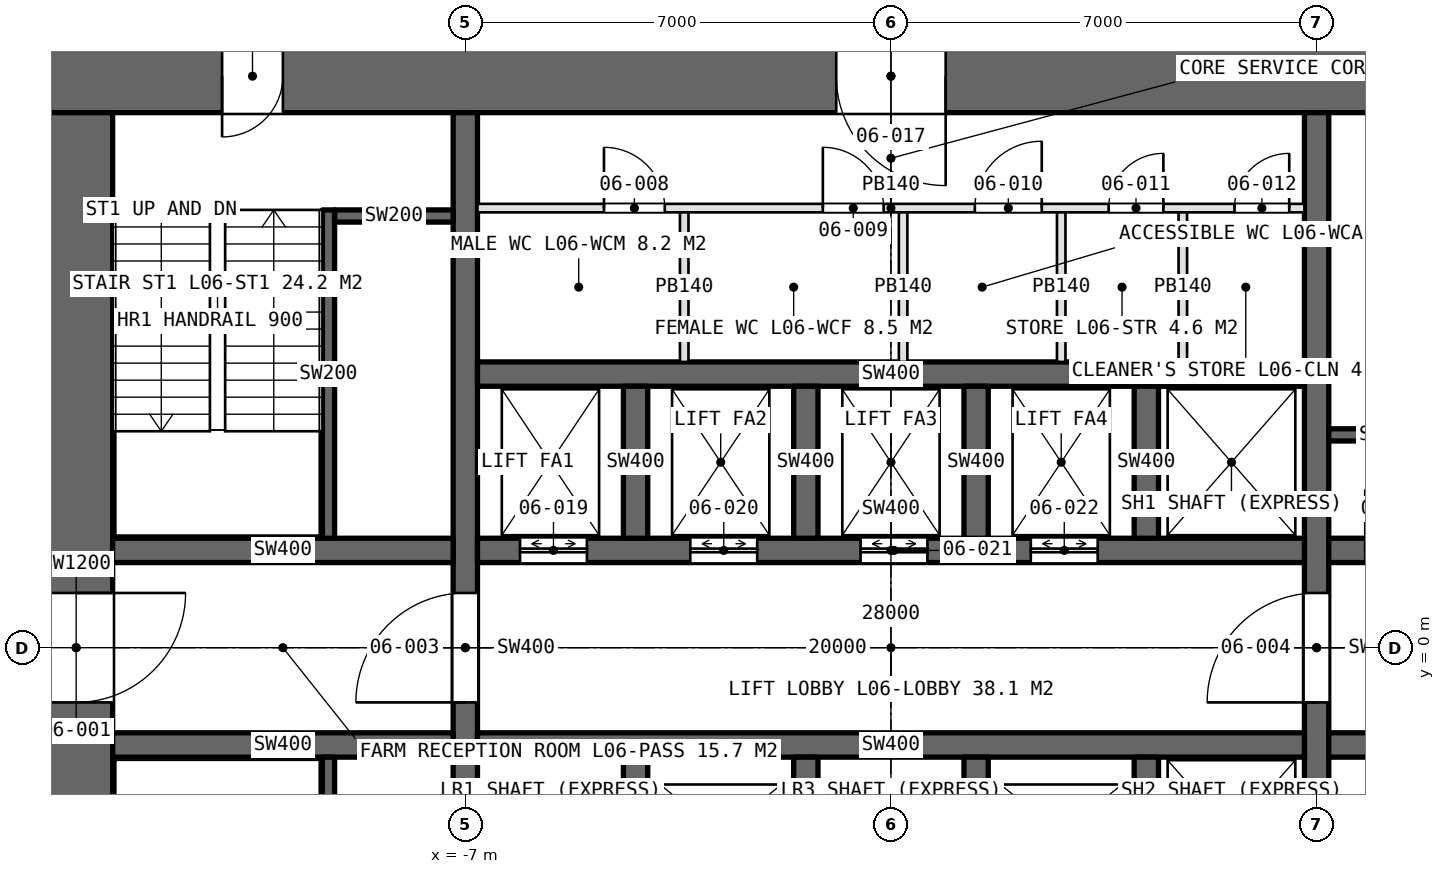
"""IFC4 building model, lengths in metres.
Left out: names, types, materials, properties, quantities, classifications, styles, units other than length and angle.
Written with IfcOpenShell. Run it as: python <this file> out.ifc"""

import sys

from ifc_helpers import new_model, si_unit, direction, frame, frame_2d, origin, place, context, subcontext, project, spatial, rectangle, extrude, element, fill, save


model = new_model("IFC4")
c1 = context("Model", 3, precision=1e-05, world=origin(), true_north=direction((0.0, 1.0)))
c2 = subcontext(c1, "Body", "Model", "MODEL_VIEW")
j1 = project(units=[si_unit("LENGTHUNIT", "METRE"), si_unit("PLANEANGLEUNIT", "RADIAN")], contexts=[c1])
p1 = place(None, origin())
s1 = spatial("IfcSite", under=j1, at=p1, CompositionType="ELEMENT")
p2 = place(p1, origin())
s2 = spatial("IfcBuilding", under=s1, at=p2, CompositionType="ELEMENT")
p3 = place(p2, frame((0.0, 0.0, 30.0)))
s3 = spatial("IfcBuildingStorey", under=s2, at=p3, CompositionType="ELEMENT", Elevation=30.0)
p4 = place(p3, frame((14.0, 9.4, 0.0), z_axis=(0.0, 0.0, 1.0), x_axis=(-1.0, 0.0, 0.0)))
e1 = element("IfcWall", 1, at=p4, inside=s3, PredefinedType="SHEAR", context=c2, shape_type="SweptSolid", body=[
    extrude(rectangle(XDim=28.0, YDim=1.2, at=frame_2d((14.0, 0.0))), origin(), (0.0, 0.0, 1.0), 5.0),
])
p5 = place(p4, frame((24.0, 0.0, 0.0)))
e2 = element("IfcOpeningElement", 2, at=p5, cuts=e1, PredefinedType="OPENING", context=c2, shape_type="SweptSolid", body=[
    extrude(rectangle(XDim=1.0, YDim=2.4, at=frame_2d((0.5, 1.2))), frame((0.0, 0.61, 0.0), z_axis=(0.0, -1.0, 0.0), x_axis=(1.0, 0.0, 0.0)), (0.0, 0.0, 1.0), 1.22),
])
p6 = place(p4, frame((13.1, 0.0, 0.0)))
e3 = element("IfcOpeningElement", 3, at=p6, cuts=e1, PredefinedType="OPENING", context=c2, shape_type="SweptSolid", body=[
    extrude(rectangle(XDim=1.8, YDim=2.4, at=frame_2d((0.9, 1.2))), frame((0.0, 0.61, 0.0), z_axis=(0.0, -1.0, 0.0), x_axis=(1.0, 0.0, 0.0)), (0.0, 0.0, 1.0), 1.22),
])
p7 = place(p3, frame((-13.4, 8.8, 0.0), z_axis=(0.0, 0.0, 1.0), x_axis=(0.0, -1.0, 0.0)))
e4 = element("IfcWall", 4, at=p7, inside=s3, PredefinedType="SHEAR", context=c2, shape_type="SweptSolid", body=[
    extrude(rectangle(XDim=17.6, YDim=1.2, at=frame_2d((8.8, 0.0))), origin(), (0.0, 0.0, 1.0), 5.0),
])
p8 = place(p7, frame((7.9, 0.0, 0.0)))
e5 = element("IfcOpeningElement", 5, at=p8, cuts=e4, PredefinedType="OPENING", context=c2, shape_type="SweptSolid", body=[
    extrude(rectangle(XDim=1.8, YDim=2.4, at=frame_2d((0.9, 1.2))), frame((0.0, 0.61, 0.0), z_axis=(0.0, -1.0, 0.0), x_axis=(1.0, 0.0, 0.0)), (0.0, 0.0, 1.0), 1.22),
])
p9 = place(p7, frame((16.5, 0.0, 0.0)))
e6 = element("IfcOpeningElement", 6, at=p9, cuts=e4, PredefinedType="OPENING", context=c2, shape_type="SweptSolid", body=[
    extrude(rectangle(XDim=1.0, YDim=2.4, at=frame_2d((0.5, 1.2))), frame((0.0, 0.61, 0.0), z_axis=(0.0, -1.0, 0.0), x_axis=(1.0, 0.0, 0.0)), (0.0, 0.0, 1.0), 1.22),
])
p10 = place(p3, frame((-7.0, -8.8, 0.0), z_axis=(0.0, 0.0, 1.0), x_axis=(0.0, 1.0, 0.0)))
e7 = element("IfcWall", 7, at=p10, inside=s3, PredefinedType="SHEAR", context=c2, shape_type="SweptSolid", body=[
    extrude(rectangle(XDim=17.6, YDim=0.4, at=frame_2d((8.8, 0.0))), origin(), (0.0, 0.0, 1.0), 5.0),
])
p11 = place(p10, frame((7.9, 0.0, 0.0)))
e8 = element("IfcOpeningElement", 8, at=p11, cuts=e7, PredefinedType="OPENING", context=c2, shape_type="SweptSolid", body=[
    extrude(rectangle(XDim=1.8, YDim=2.4, at=frame_2d((0.9, 1.2))), frame((0.0, 0.21, 0.0), z_axis=(0.0, -1.0, 0.0), x_axis=(1.0, 0.0, 0.0)), (0.0, 0.0, 1.0), 0.42),
])
p12 = place(p3, frame((7.0, -8.8, 0.0), z_axis=(0.0, 0.0, 1.0), x_axis=(0.0, 1.0, 0.0)))
e9 = element("IfcWall", 9, at=p12, inside=s3, PredefinedType="SHEAR", context=c2, shape_type="SweptSolid", body=[
    extrude(rectangle(XDim=17.6, YDim=0.4, at=frame_2d((8.8, 0.0))), origin(), (0.0, 0.0, 1.0), 5.0),
])
p13 = place(p12, frame((7.9, 0.0, 0.0)))
e10 = element("IfcOpeningElement", 10, at=p13, cuts=e9, PredefinedType="OPENING", context=c2, shape_type="SweptSolid", body=[
    extrude(rectangle(XDim=1.8, YDim=2.4, at=frame_2d((0.9, 1.2))), frame((0.0, 0.21, 0.0), z_axis=(0.0, -1.0, 0.0), x_axis=(1.0, 0.0, 0.0)), (0.0, 0.0, 1.0), 0.42),
])
p14 = place(p3, frame((-6.8, 1.6, 0.0), z_axis=(0.0, 0.0, 1.0), x_axis=(1.0, 0.0, 0.0)))
e11 = element("IfcWall", 11, at=p14, inside=s3, PredefinedType="SHEAR", context=c2, shape_type="SweptSolid", body=[
    extrude(rectangle(XDim=13.6, YDim=0.4, at=frame_2d((6.8, 0.0))), origin(), (0.0, 0.0, 1.0), 5.0),
])
p15 = place(p14, frame((0.7, 0.0, 0.0)))
e12 = element("IfcOpeningElement", 12, at=p15, cuts=e11, PredefinedType="OPENING", context=c2, shape_type="SweptSolid", body=[
    extrude(rectangle(XDim=1.1, YDim=2.4, at=frame_2d((0.55, 1.2))), frame((0.0, 0.21, 0.0), z_axis=(0.0, -1.0, 0.0), x_axis=(1.0, 0.0, 0.0)), (0.0, 0.0, 1.0), 0.42),
])
p16 = place(p14, frame((3.5, 0.0, 0.0)))
e13 = element("IfcOpeningElement", 13, at=p16, cuts=e11, PredefinedType="OPENING", context=c2, shape_type="SweptSolid", body=[
    extrude(rectangle(XDim=1.1, YDim=2.4, at=frame_2d((0.55, 1.2))), frame((0.0, 0.21, 0.0), z_axis=(0.0, -1.0, 0.0), x_axis=(1.0, 0.0, 0.0)), (0.0, 0.0, 1.0), 0.42),
])
p17 = place(p14, frame((6.3, 0.0, 0.0)))
e14 = element("IfcOpeningElement", 14, at=p17, cuts=e11, PredefinedType="OPENING", context=c2, shape_type="SweptSolid", body=[
    extrude(rectangle(XDim=1.1, YDim=2.4, at=frame_2d((0.55, 1.2))), frame((0.0, 0.21, 0.0), z_axis=(0.0, -1.0, 0.0), x_axis=(1.0, 0.0, 0.0)), (0.0, 0.0, 1.0), 0.42),
])
p18 = place(p14, frame((9.1, 0.0, 0.0)))
e15 = element("IfcOpeningElement", 15, at=p18, cuts=e11, PredefinedType="OPENING", context=c2, shape_type="SweptSolid", body=[
    extrude(rectangle(XDim=1.1, YDim=2.4, at=frame_2d((0.55, 1.2))), frame((0.0, 0.21, 0.0), z_axis=(0.0, -1.0, 0.0), x_axis=(1.0, 0.0, 0.0)), (0.0, 0.0, 1.0), 0.42),
])
for number, where, z_axis, x_axis in (
    (16, (-6.8, -1.6, 0.0), (0.0, 0.0, 1.0), (1.0, 0.0, 0.0)),
    (17, (-6.8, 4.5, 0.0), (0.0, 0.0, 1.0), (1.0, 0.0, 0.0)),
):
    element("IfcWall", number, at=place(p3, frame(where, z_axis=z_axis, x_axis=x_axis)), inside=s3, PredefinedType="SHEAR", context=c2, shape_type="SweptSolid", body=[
        extrude(rectangle(XDim=13.6, YDim=0.4, at=frame_2d((6.8, 0.0))), origin(), (0.0, 0.0, 1.0), 5.0),
    ])
for number, where, z_axis, x_axis in (
    (18, (-12.8, 1.6, 0.0), (0.0, 0.0, 1.0), (1.0, 0.0, 0.0)),
    (19, (-12.8, -1.6, 0.0), (0.0, 0.0, 1.0), (1.0, 0.0, 0.0)),
):
    element("IfcWall", number, at=place(p3, frame(where, z_axis=z_axis, x_axis=x_axis)), inside=s3, PredefinedType="SHEAR", context=c2, shape_type="SweptSolid", body=[
        extrude(rectangle(XDim=5.6, YDim=0.4, at=frame_2d((2.8, 0.0))), origin(), (0.0, 0.0, 1.0), 5.0),
    ])
p19 = place(p3, frame((7.2, 1.6, 0.0), z_axis=(0.0, 0.0, 1.0), x_axis=(1.0, 0.0, 0.0)))
e20 = element("IfcWall", 20, at=p19, inside=s3, PredefinedType="SHEAR", context=c2, shape_type="SweptSolid", body=[
    extrude(rectangle(XDim=5.6, YDim=0.4, at=frame_2d((2.8, 0.0))), origin(), (0.0, 0.0, 1.0), 5.0),
])
p20 = place(p19, frame((0.6, 0.0, 0.0)))
e21 = element("IfcOpeningElement", 21, at=p20, cuts=e20, PredefinedType="OPENING", context=c2, shape_type="SweptSolid", body=[
    extrude(rectangle(XDim=1.0, YDim=2.4, at=frame_2d((0.5, 1.2))), frame((0.0, 0.21, 0.0), z_axis=(0.0, -1.0, 0.0), x_axis=(1.0, 0.0, 0.0)), (0.0, 0.0, 1.0), 0.42),
])
p21 = place(p3, frame((7.2, -1.6, 0.0), z_axis=(0.0, 0.0, 1.0), x_axis=(1.0, 0.0, 0.0)))
e22 = element("IfcWall", 22, at=p21, inside=s3, PredefinedType="SHEAR", context=c2, shape_type="SweptSolid", body=[
    extrude(rectangle(XDim=5.6, YDim=0.4, at=frame_2d((2.8, 0.0))), origin(), (0.0, 0.0, 1.0), 5.0),
])
p22 = place(p21, frame((0.9, 0.0, 0.0)))
e23 = element("IfcOpeningElement", 23, at=p22, cuts=e22, PredefinedType="OPENING", context=c2, shape_type="SweptSolid", body=[
    extrude(rectangle(XDim=1.3, YDim=2.4, at=frame_2d((0.65, 1.2))), frame((0.0, 0.21, 0.0), z_axis=(0.0, -1.0, 0.0), x_axis=(1.0, 0.0, 0.0)), (0.0, 0.0, 1.0), 0.42),
])
p23 = place(p21, frame((3.9, 0.0, 0.0)))
e24 = element("IfcOpeningElement", 24, at=p23, cuts=e22, PredefinedType="OPENING", context=c2, shape_type="SweptSolid", body=[
    extrude(rectangle(XDim=1.3, YDim=2.4, at=frame_2d((0.65, 1.2))), frame((0.0, 0.21, 0.0), z_axis=(0.0, -1.0, 0.0), x_axis=(1.0, 0.0, 0.0)), (0.0, 0.0, 1.0), 0.42),
])
for number, where, z_axis, x_axis in (
    (25, (-4.2, 1.8, 0.0), (0.0, 0.0, 1.0), (0.0, 1.0, 0.0)),
    (26, (-4.2, -4.3, 0.0), (0.0, 0.0, 1.0), (0.0, 1.0, 0.0)),
    (27, (-1.4, 1.8, 0.0), (0.0, 0.0, 1.0), (0.0, 1.0, 0.0)),
    (28, (-1.4, -4.3, 0.0), (0.0, 0.0, 1.0), (0.0, 1.0, 0.0)),
    (29, (1.4, 1.8, 0.0), (0.0, 0.0, 1.0), (0.0, 1.0, 0.0)),
    (30, (1.4, -4.3, 0.0), (0.0, 0.0, 1.0), (0.0, 1.0, 0.0)),
    (31, (4.2, 1.8, 0.0), (0.0, 0.0, 1.0), (0.0, 1.0, 0.0)),
    (32, (4.2, -4.3, 0.0), (0.0, 0.0, 1.0), (0.0, 1.0, 0.0)),
):
    element("IfcWall", number, at=place(p3, frame(where, z_axis=z_axis, x_axis=x_axis)), inside=s3, PredefinedType="SHEAR", context=c2, shape_type="SweptSolid", body=[
        extrude(rectangle(XDim=2.5, YDim=0.4, at=frame_2d((1.25, 0.0))), origin(), (0.0, 0.0, 1.0), 5.0),
    ])
p24 = place(p3, frame((-6.8, 7.23, 0.0), z_axis=(0.0, 0.0, 1.0), x_axis=(1.0, 0.0, 0.0)))
e33 = element("IfcWall", 33, at=p24, inside=s3, PredefinedType="PARTITIONING", context=c2, shape_type="SweptSolid", body=[
    extrude(rectangle(XDim=13.6, YDim=0.14, at=frame_2d((6.8, 0.0))), origin(), (0.0, 0.0, 1.0), 4.75),
])
p25 = place(p24, frame((2.08, 0.0, 0.0)))
e34 = element("IfcOpeningElement", 34, at=p25, cuts=e33, PredefinedType="OPENING", context=c2, shape_type="SweptSolid", body=[
    extrude(rectangle(XDim=1.0, YDim=2.4, at=frame_2d((0.5, 1.2))), frame((0.0, 0.08, 0.0), z_axis=(0.0, -1.0, 0.0), x_axis=(1.0, 0.0, 0.0)), (0.0, 0.0, 1.0), 0.16),
])
p26 = place(p24, frame((5.68, 0.0, 0.0)))
e35 = element("IfcOpeningElement", 35, at=p26, cuts=e33, PredefinedType="OPENING", context=c2, shape_type="SweptSolid", body=[
    extrude(rectangle(XDim=1.0, YDim=2.4, at=frame_2d((0.5, 1.2))), frame((0.0, 0.08, 0.0), z_axis=(0.0, -1.0, 0.0), x_axis=(1.0, 0.0, 0.0)), (0.0, 0.0, 1.0), 0.16),
])
p27 = place(p24, frame((8.18, 0.0, 0.0)))
e36 = element("IfcOpeningElement", 36, at=p27, cuts=e33, PredefinedType="OPENING", context=c2, shape_type="SweptSolid", body=[
    extrude(rectangle(XDim=1.1, YDim=2.4, at=frame_2d((0.55, 1.2))), frame((0.0, 0.08, 0.0), z_axis=(0.0, -1.0, 0.0), x_axis=(1.0, 0.0, 0.0)), (0.0, 0.0, 1.0), 0.16),
])
p28 = place(p24, frame((10.38, 0.0, 0.0)))
e37 = element("IfcOpeningElement", 37, at=p28, cuts=e33, PredefinedType="OPENING", context=c2, shape_type="SweptSolid", body=[
    extrude(rectangle(XDim=0.9, YDim=2.4, at=frame_2d((0.45, 1.2))), frame((0.0, 0.08, 0.0), z_axis=(0.0, -1.0, 0.0), x_axis=(1.0, 0.0, 0.0)), (0.0, 0.0, 1.0), 0.16),
])
p29 = place(p24, frame((12.45, 0.0, 0.0)))
e38 = element("IfcOpeningElement", 38, at=p29, cuts=e33, PredefinedType="OPENING", context=c2, shape_type="SweptSolid", body=[
    extrude(rectangle(XDim=0.9, YDim=2.4, at=frame_2d((0.45, 1.2))), frame((0.0, 0.08, 0.0), z_axis=(0.0, -1.0, 0.0), x_axis=(1.0, 0.0, 0.0)), (0.0, 0.0, 1.0), 0.16),
])
for number, where, z_axis, x_axis in (
    (39, (-3.4, 4.7, 0.0), (0.0, 0.0, 1.0), (0.0, 1.0, 0.0)),
    (40, (0.2, 4.7, 0.0), (0.0, 0.0, 1.0), (0.0, 1.0, 0.0)),
    (41, (2.8, 4.7, 0.0), (0.0, 0.0, 1.0), (0.0, 1.0, 0.0)),
    (42, (4.8, 4.7, 0.0), (0.0, 0.0, 1.0), (0.0, 1.0, 0.0)),
):
    element("IfcWall", number, at=place(p3, frame(where, z_axis=z_axis, x_axis=x_axis)), inside=s3, PredefinedType="PARTITIONING", context=c2, shape_type="SweptSolid", body=[
        extrude(rectangle(XDim=2.46, YDim=0.14, at=frame_2d((1.23, 0.0))), origin(), (0.0, 0.0, 1.0), 4.75),
    ])
p30 = place(p3, frame((-9.25, 7.2, 0.0), z_axis=(0.0, 0.0, 1.0), x_axis=(0.0, -1.0, 0.0)))
e43 = element("IfcWall", 43, at=p30, inside=s3, PredefinedType="SOLIDWALL", context=c2, shape_type="SweptSolid", body=[
    extrude(rectangle(XDim=5.4, YDim=0.2, at=frame_2d((2.7, 0.0))), origin(), (0.0, 0.0, 1.0), 5.0),
])
p31 = place(p3, frame((-9.15, 7.1, 0.0), z_axis=(0.0, 0.0, 1.0), x_axis=(1.0, 0.0, 0.0)))
e44 = element("IfcWall", 44, at=p31, inside=s3, PredefinedType="SOLIDWALL", context=c2, shape_type="SweptSolid", body=[
    extrude(rectangle(XDim=1.95, YDim=0.2, at=frame_2d((0.975, 0.0))), origin(), (0.0, 0.0, 1.0), 5.0),
])
p32 = place(p3, frame((-9.25, -7.2, 0.0), z_axis=(0.0, 0.0, 1.0), x_axis=(0.0, 1.0, 0.0)))
e45 = element("IfcWall", 45, at=p32, inside=s3, PredefinedType="SOLIDWALL", context=c2, shape_type="SweptSolid", body=[
    extrude(rectangle(XDim=5.4, YDim=0.2, at=frame_2d((2.7, 0.0))), origin(), (0.0, 0.0, 1.0), 5.0),
])
p33 = place(p3, frame((9.15, 3.5, 0.0), z_axis=(0.0, 0.0, 1.0), x_axis=(-1.0, 0.0, 0.0)))
e46 = element("IfcWall", 46, at=p33, inside=s3, PredefinedType="SOLIDWALL", context=c2, shape_type="SweptSolid", body=[
    extrude(rectangle(XDim=1.95, YDim=0.2, at=frame_2d((0.975, 0.0))), origin(), (0.0, 0.0, 1.0), 5.0),
])
p34 = place(p8, origin())
e47 = element("IfcDoor", 47, at=p34, inside=s3, OperationType="DOUBLE_DOOR_SINGLE_SWING", PredefinedType="DOOR", context=c2, shape_type="SweptSolid", body=[
    extrude(rectangle(XDim=1.8, YDim=2.4, at=frame_2d((0.9, 1.2))), frame((0.0, 0.025, 0.0), z_axis=(0.0, -1.0, 0.0), x_axis=(1.0, 0.0, 0.0)), (0.0, 0.0, 1.0), 0.05),
])
fill(e5, e47)
p35 = place(p11, origin())
e48 = element("IfcDoor", 48, at=p35, inside=s3, OperationType="DOUBLE_DOOR_SINGLE_SWING", PredefinedType="DOOR", context=c2, shape_type="SweptSolid", body=[
    extrude(rectangle(XDim=1.8, YDim=2.4, at=frame_2d((0.9, 1.2))), frame((0.0, 0.025, 0.0), z_axis=(0.0, -1.0, 0.0), x_axis=(1.0, 0.0, 0.0)), (0.0, 0.0, 1.0), 0.05),
])
fill(e8, e48)
p36 = place(p13, origin())
e49 = element("IfcDoor", 49, at=p36, inside=s3, OperationType="DOUBLE_DOOR_SINGLE_SWING", PredefinedType="DOOR", context=c2, shape_type="SweptSolid", body=[
    extrude(rectangle(XDim=1.8, YDim=2.4, at=frame_2d((0.9, 1.2))), frame((0.0, 0.025, 0.0), z_axis=(0.0, -1.0, 0.0), x_axis=(1.0, 0.0, 0.0)), (0.0, 0.0, 1.0), 0.05),
])
fill(e10, e49)
p37 = place(p5, origin())
e50 = element("IfcDoor", 50, at=p37, inside=s3, OperationType="SINGLE_SWING_RIGHT", PredefinedType="DOOR", context=c2, shape_type="SweptSolid", body=[
    extrude(rectangle(XDim=1.0, YDim=2.4, at=frame_2d((0.5, 1.2))), frame((0.0, 0.025, 0.0), z_axis=(0.0, -1.0, 0.0), x_axis=(1.0, 0.0, 0.0)), (0.0, 0.0, 1.0), 0.05),
])
fill(e2, e50)
p38 = place(p25, origin())
e51 = element("IfcDoor", 51, at=p38, inside=s3, OperationType="SINGLE_SWING_LEFT", PredefinedType="DOOR", context=c2, shape_type="SweptSolid", body=[
    extrude(rectangle(XDim=1.0, YDim=2.4, at=frame_2d((0.5, 1.2))), frame((0.0, 0.025, 0.0), z_axis=(0.0, -1.0, 0.0), x_axis=(1.0, 0.0, 0.0)), (0.0, 0.0, 1.0), 0.05),
])
fill(e34, e51)
p39 = place(p26, origin())
e52 = element("IfcDoor", 52, at=p39, inside=s3, OperationType="SINGLE_SWING_LEFT", PredefinedType="DOOR", context=c2, shape_type="SweptSolid", body=[
    extrude(rectangle(XDim=1.0, YDim=2.4, at=frame_2d((0.5, 1.2))), frame((0.0, 0.025, 0.0), z_axis=(0.0, -1.0, 0.0), x_axis=(1.0, 0.0, 0.0)), (0.0, 0.0, 1.0), 0.05),
])
fill(e35, e52)
p40 = place(p27, origin())
e53 = element("IfcDoor", 53, at=p40, inside=s3, OperationType="SINGLE_SWING_RIGHT", PredefinedType="DOOR", context=c2, shape_type="SweptSolid", body=[
    extrude(rectangle(XDim=1.1, YDim=2.4, at=frame_2d((0.55, 1.2))), frame((0.0, 0.025, 0.0), z_axis=(0.0, -1.0, 0.0), x_axis=(1.0, 0.0, 0.0)), (0.0, 0.0, 1.0), 0.05),
])
fill(e36, e53)
p41 = place(p28, origin())
e54 = element("IfcDoor", 54, at=p41, inside=s3, OperationType="SINGLE_SWING_RIGHT", PredefinedType="DOOR", context=c2, shape_type="SweptSolid", body=[
    extrude(rectangle(XDim=0.9, YDim=2.4, at=frame_2d((0.45, 1.2))), frame((0.0, 0.025, 0.0), z_axis=(0.0, -1.0, 0.0), x_axis=(1.0, 0.0, 0.0)), (0.0, 0.0, 1.0), 0.05),
])
fill(e37, e54)
p42 = place(p29, origin())
e55 = element("IfcDoor", 55, at=p42, inside=s3, OperationType="SINGLE_SWING_RIGHT", PredefinedType="DOOR", context=c2, shape_type="SweptSolid", body=[
    extrude(rectangle(XDim=0.9, YDim=2.4, at=frame_2d((0.45, 1.2))), frame((0.0, 0.025, 0.0), z_axis=(0.0, -1.0, 0.0), x_axis=(1.0, 0.0, 0.0)), (0.0, 0.0, 1.0), 0.05),
])
fill(e38, e55)
p43 = place(p6, origin())
e56 = element("IfcDoor", 56, at=p43, inside=s3, OperationType="DOUBLE_DOOR_SINGLE_SWING", PredefinedType="DOOR", context=c2, shape_type="SweptSolid", body=[
    extrude(rectangle(XDim=1.8, YDim=2.4, at=frame_2d((0.9, 1.2))), frame((0.0, 0.025, 0.0), z_axis=(0.0, -1.0, 0.0), x_axis=(1.0, 0.0, 0.0)), (0.0, 0.0, 1.0), 0.05),
])
fill(e3, e56)
p44 = place(p15, origin())
e57 = element("IfcDoor", 57, at=p44, inside=s3, OperationType="DOUBLE_DOOR_SLIDING", PredefinedType="DOOR", context=c2, shape_type="SweptSolid", body=[
    extrude(rectangle(XDim=1.1, YDim=2.4, at=frame_2d((0.55, 1.2))), frame((0.0, 0.025, 0.0), z_axis=(0.0, -1.0, 0.0), x_axis=(1.0, 0.0, 0.0)), (0.0, 0.0, 1.0), 0.05),
])
fill(e12, e57)
p45 = place(p16, origin())
e58 = element("IfcDoor", 58, at=p45, inside=s3, OperationType="DOUBLE_DOOR_SLIDING", PredefinedType="DOOR", context=c2, shape_type="SweptSolid", body=[
    extrude(rectangle(XDim=1.1, YDim=2.4, at=frame_2d((0.55, 1.2))), frame((0.0, 0.025, 0.0), z_axis=(0.0, -1.0, 0.0), x_axis=(1.0, 0.0, 0.0)), (0.0, 0.0, 1.0), 0.05),
])
fill(e13, e58)
p46 = place(p17, origin())
e59 = element("IfcDoor", 59, at=p46, inside=s3, OperationType="DOUBLE_DOOR_SLIDING", PredefinedType="DOOR", context=c2, shape_type="SweptSolid", body=[
    extrude(rectangle(XDim=1.1, YDim=2.4, at=frame_2d((0.55, 1.2))), frame((0.0, 0.025, 0.0), z_axis=(0.0, -1.0, 0.0), x_axis=(1.0, 0.0, 0.0)), (0.0, 0.0, 1.0), 0.05),
])
fill(e14, e59)
p47 = place(p18, origin())
e60 = element("IfcDoor", 60, at=p47, inside=s3, OperationType="DOUBLE_DOOR_SLIDING", PredefinedType="DOOR", context=c2, shape_type="SweptSolid", body=[
    extrude(rectangle(XDim=1.1, YDim=2.4, at=frame_2d((0.55, 1.2))), frame((0.0, 0.025, 0.0), z_axis=(0.0, -1.0, 0.0), x_axis=(1.0, 0.0, 0.0)), (0.0, 0.0, 1.0), 0.05),
])
fill(e15, e60)
save(model, sys.argv[1])
